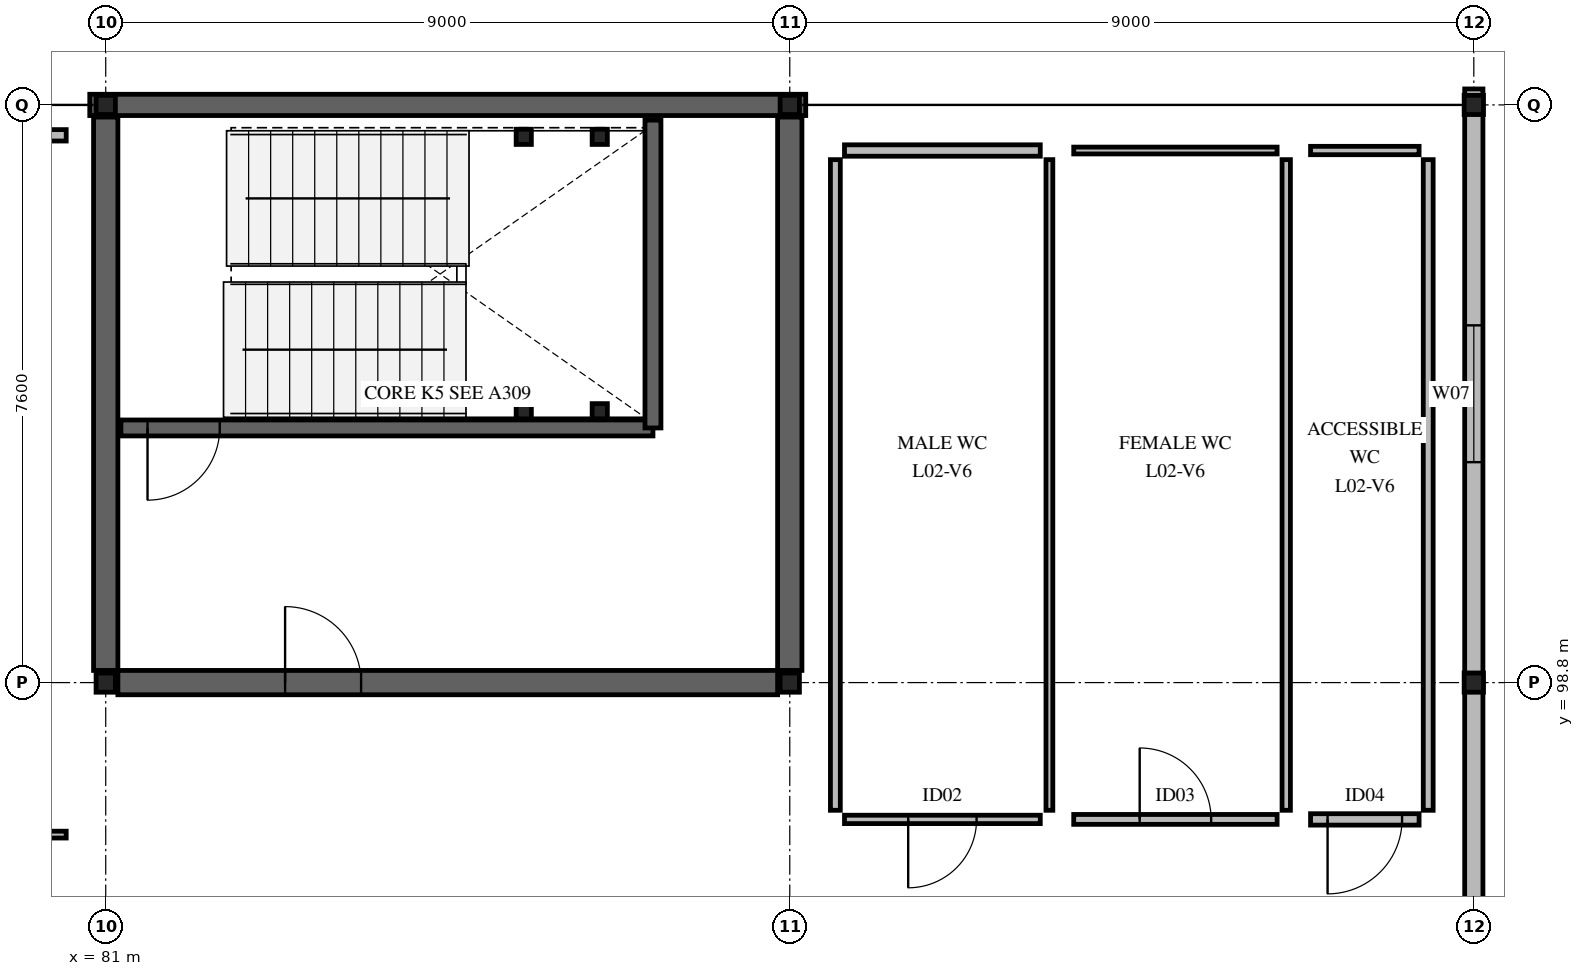
"""IFC4 building model, lengths in metres.
Left out: names, types, materials, properties, quantities, classifications, styles, units other than length and angle.
Written with IfcOpenShell. Run it as: python <this file> out.ifc"""

import sys

from ifc_helpers import new_model, si_unit, direction, frame, frame_2d, origin, origin_2d, place, context, subcontext, project, spatial, rectangle, hollow_rectangle, i_section, extrude, element, fill, save


model = new_model("IFC4")
c1 = context("Model", 3, precision=1e-05, world=origin(), true_north=direction((0.0, 1.0)))
c2 = subcontext(c1, "Body", "Model", "MODEL_VIEW")
j1 = project(units=[si_unit("LENGTHUNIT", "METRE"), si_unit("PLANEANGLEUNIT", "RADIAN")], contexts=[c1])
p1 = place(None, origin())
s1 = spatial("IfcSite", under=j1, at=p1, CompositionType="ELEMENT")
p2 = place(p1, origin())
s2 = spatial("IfcBuilding", under=s1, at=p2, CompositionType="ELEMENT")
p3 = place(p2, frame((0.0, 0.0, 9.36)))
s3 = spatial("IfcBuildingStorey", under=s2, at=p3, CompositionType="ELEMENT", Elevation=9.36)
for number, where, z_axis, x_axis in (
    (1, (81.0, 98.8, 0.0), (0.0, 0.0, 1.0), (1.0, 0.0, 0.0)),
    (2, (81.0, 106.4, 0.0), (0.0, 0.0, 1.0), (1.0, 0.0, 0.0)),
    (3, (90.0, 98.8, 0.0), (0.0, 0.0, 1.0), (1.0, 0.0, 0.0)),
    (4, (90.0, 106.4, 0.0), (0.0, 0.0, 1.0), (1.0, 0.0, 0.0)),
    (5, (99.0, 98.8, 0.0), (0.0, 0.0, 1.0), (1.0, 0.0, 0.0)),
    (6, (99.0, 106.4, 0.0), (0.0, 0.0, 1.0), (1.0, 0.0, 0.0)),
):
    element("IfcColumn", number, at=place(p3, frame(where, z_axis=z_axis, x_axis=x_axis)), inside=s3, PredefinedType="COLUMN", context=c2, shape_type="SweptSolid", body=[
        extrude(i_section(OverallWidth=0.254, OverallDepth=0.253, WebThickness=0.009, FlangeThickness=0.014, FilletRadius=0.012, at=origin_2d()), origin(), (0.0, 0.0, 1.0), 4.32),
    ])
p4 = place(p3, frame((80.79, 106.4, 0.0), z_axis=(0.0, 0.0, 1.0), x_axis=(1.0, 0.0, 0.0)))
e7 = element("IfcWall", 7, at=p4, inside=s3, PredefinedType="SOLIDWALL", context=c2, shape_type="SweptSolid", body=[
    extrude(rectangle(XDim=9.42, YDim=0.28, at=frame_2d((4.71, 0.0))), origin(), (0.0, 0.0, 1.0), 4.08),
])
p5 = place(p3, frame((99.0, 90.99, 0.0), z_axis=(0.0, 0.0, 1.0), x_axis=(0.0, 1.0, 0.0)))
e8 = element("IfcWall", 8, at=p5, inside=s3, PredefinedType="STANDARD", context=c2, shape_type="SweptSolid", body=[
    extrude(rectangle(XDim=7.81, YDim=0.24, at=frame_2d((3.905, 0.0))), origin(), (0.0, 0.0, 1.0), 3.701),
])
p6 = place(p5, frame((3.26, 0.0, 0.85)))
e9 = element("IfcOpeningElement", 9, at=p6, cuts=e8, PredefinedType="OPENING", context=c2, shape_type="SweptSolid", body=[
    extrude(rectangle(XDim=1.5, YDim=1.2, at=frame_2d((0.75, 0.6))), frame((0.0, 0.13, 0.0), z_axis=(0.0, -1.0, 0.0), x_axis=(1.0, 0.0, 0.0)), (0.0, 0.0, 1.0), 0.26),
])
p7 = place(p3, frame((99.0, 98.8, 0.0), z_axis=(0.0, 0.0, 1.0), x_axis=(0.0, 1.0, 0.0)))
e10 = element("IfcWall", 10, at=p7, inside=s3, PredefinedType="STANDARD", context=c2, shape_type="SweptSolid", body=[
    extrude(rectangle(XDim=7.81, YDim=0.24, at=frame_2d((3.905, 0.0))), origin(), (0.0, 0.0, 1.0), 3.701),
])
p8 = place(p7, frame((2.9, 0.0, 0.85)))
e11 = element("IfcOpeningElement", 11, at=p8, cuts=e10, PredefinedType="OPENING", context=c2, shape_type="SweptSolid", body=[
    extrude(rectangle(XDim=1.8, YDim=1.2, at=frame_2d((0.9, 0.6))), frame((0.0, 0.13, 0.0), z_axis=(0.0, -1.0, 0.0), x_axis=(1.0, 0.0, 0.0)), (0.0, 0.0, 1.0), 0.26),
])
p9 = place(p3, frame((81.16, 98.8, 0.0), z_axis=(0.0, 0.0, 1.0), x_axis=(1.0, 0.0, 0.0)))
e12 = element("IfcWall", 12, at=p9, inside=s3, PredefinedType="SHEAR", context=c2, shape_type="SweptSolid", body=[
    extrude(rectangle(XDim=8.68, YDim=0.32, at=frame_2d((4.34, 0.0))), origin(), (0.0, 0.0, 1.0), 4.04),
])
p10 = place(p9, frame((2.2, 0.0, 0.0)))
e13 = element("IfcOpeningElement", 13, at=p10, cuts=e12, PredefinedType="OPENING", context=c2, shape_type="SweptSolid", body=[
    extrude(rectangle(XDim=1.0, YDim=2.15, at=frame_2d((0.5, 1.075))), frame((0.0, 0.17, 0.0), z_axis=(0.0, -1.0, 0.0), x_axis=(1.0, 0.0, 0.0)), (0.0, 0.0, 1.0), 0.34),
])
for number, where, z_axis, x_axis in (
    (14, (81.0, 98.96, 0.0), (0.0, 0.0, 1.0), (0.0, 1.0, 0.0)),
    (15, (90.0, 98.96, 0.0), (0.0, 0.0, 1.0), (0.0, 1.0, 0.0)),
):
    element("IfcWall", number, at=place(p3, frame(where, z_axis=z_axis, x_axis=x_axis)), inside=s3, PredefinedType="SHEAR", context=c2, shape_type="SweptSolid", body=[
        extrude(rectangle(XDim=7.28, YDim=0.32, at=frame_2d((3.64, 0.0))), origin(), (0.0, 0.0, 1.0), 4.04),
    ])
p11 = place(p3, frame((81.2, 102.15, 0.0), z_axis=(0.0, 0.0, 1.0), x_axis=(1.0, 0.0, 0.0)))
e16 = element("IfcWall", 16, at=p11, inside=s3, PredefinedType="SOLIDWALL", context=c2, shape_type="SweptSolid", body=[
    extrude(rectangle(XDim=7.0, YDim=0.21, at=frame_2d((3.5, 0.0))), origin(), (0.0, 0.0, 1.0), 4.04),
])
p12 = place(p11, frame((0.35, 0.0, 0.0)))
e17 = element("IfcOpeningElement", 17, at=p12, cuts=e16, PredefinedType="OPENING", context=c2, shape_type="SweptSolid", body=[
    extrude(rectangle(XDim=0.95, YDim=2.12, at=frame_2d((0.475, 1.06))), frame((0.0, 0.115, 0.0), z_axis=(0.0, -1.0, 0.0), x_axis=(1.0, 0.0, 0.0)), (0.0, 0.0, 1.0), 0.23),
])
p13 = place(p3, frame((88.2, 102.15, 0.0), z_axis=(0.0, 0.0, 1.0), x_axis=(0.0, 1.0, 0.0)))
e18 = element("IfcWall", 18, at=p13, inside=s3, PredefinedType="SOLIDWALL", context=c2, shape_type="SweptSolid", body=[
    extrude(rectangle(XDim=4.05, YDim=0.21, at=frame_2d((2.025, 0.0))), origin(), (0.0, 0.0, 1.0), 4.04),
])
for number, where, z_axis, x_axis in (
    (19, (86.5, 102.37, 0.0), (0.0, 0.0, 1.0), (1.0, 0.0, 0.0)),
    (20, (86.5, 105.98, 0.0), (0.0, 0.0, 1.0), (1.0, 0.0, 0.0)),
    (21, (87.5, 102.37, 0.0), (0.0, 0.0, 1.0), (1.0, 0.0, 0.0)),
    (22, (87.5, 105.98, 0.0), (0.0, 0.0, 1.0), (1.0, 0.0, 0.0)),
):
    element("IfcColumn", number, at=place(p3, frame(where, z_axis=z_axis, x_axis=x_axis)), inside=s3, PredefinedType="COLUMN", context=c2, shape_type="SweptSolid", body=[
        extrude(hollow_rectangle(XDim=0.2, YDim=0.2, WallThickness=0.012, at=origin_2d()), origin(), (0.0, 0.0, 1.0), 1.97),
    ])
p14 = place(p3, frame((54.52, 96.8, 0.0), z_axis=(0.0, 0.0, 1.0), x_axis=(1.0, 0.0, 0.0)))
e23 = element("IfcWall", 23, at=p14, inside=s3, PredefinedType="PARTITIONING", context=c2, shape_type="SweptSolid", body=[
    extrude(rectangle(XDim=25.96, YDim=0.09, at=frame_2d((12.98, 0.0))), origin(), (0.0, 0.0, 1.0), 4.04),
])
p15 = place(p14, frame((12.47, 0.0, 0.0)))
e24 = element("IfcOpeningElement", 24, at=p15, cuts=e23, PredefinedType="OPENING", context=c2, shape_type="SweptSolid", body=[
    extrude(rectangle(XDim=1.02, YDim=2.1, at=frame_2d((0.51, 1.05))), frame((0.0, 0.055, 0.0), z_axis=(0.0, -1.0, 0.0), x_axis=(1.0, 0.0, 0.0)), (0.0, 0.0, 1.0), 0.11),
])
p16 = place(p3, frame((54.52, 106.0, 0.0), z_axis=(0.0, 0.0, 1.0), x_axis=(1.0, 0.0, 0.0)))
e25 = element("IfcWall", 25, at=p16, inside=s3, PredefinedType="PARTITIONING", context=c2, shape_type="SweptSolid", body=[
    extrude(rectangle(XDim=25.96, YDim=0.15, at=frame_2d((12.98, 0.0))), origin(), (0.0, 0.0, 1.0), 4.04),
])
p17 = place(p3, frame((90.6, 97.12, 0.0), z_axis=(0.0, 0.0, 1.0), x_axis=(0.0, 1.0, 0.0)))
e26 = element("IfcWall", 26, at=p17, inside=s3, PredefinedType="PARTITIONING", context=c2, shape_type="SweptSolid", body=[
    extrude(rectangle(XDim=8.56, YDim=0.13, at=frame_2d((4.28, 0.0))), origin(), (0.0, 0.0, 1.0), 4.04),
])
p18 = place(p3, frame((90.72, 97.0, 0.0), z_axis=(0.0, 0.0, 1.0), x_axis=(1.0, 0.0, 0.0)))
e27 = element("IfcWall", 27, at=p18, inside=s3, PredefinedType="PARTITIONING", context=c2, shape_type="SweptSolid", body=[
    extrude(rectangle(XDim=2.576, YDim=0.11, at=frame_2d((1.288, 0.0))), origin(), (0.0, 0.0, 1.0), 4.04),
])
p19 = place(p18, frame((0.838, 0.0, 0.0)))
e28 = element("IfcOpeningElement", 28, at=p19, cuts=e27, PredefinedType="OPENING", context=c2, shape_type="SweptSolid", body=[
    extrude(rectangle(XDim=0.9, YDim=2.06, at=frame_2d((0.45, 1.03))), frame((0.0, 0.065, 0.0), z_axis=(0.0, -1.0, 0.0), x_axis=(1.0, 0.0, 0.0)), (0.0, 0.0, 1.0), 0.13),
])
p20 = place(p3, frame((93.416, 97.12, 0.0), z_axis=(0.0, 0.0, 1.0), x_axis=(0.0, 1.0, 0.0)))
e29 = element("IfcWall", 29, at=p20, inside=s3, PredefinedType="PARTITIONING", context=c2, shape_type="SweptSolid", body=[
    extrude(rectangle(XDim=8.56, YDim=0.09, at=frame_2d((4.28, 0.0))), origin(), (0.0, 0.0, 1.0), 4.04),
])
p21 = place(p3, frame((90.72, 105.8, 0.0), z_axis=(0.0, 0.0, 1.0), x_axis=(1.0, 0.0, 0.0)))
e30 = element("IfcWall", 30, at=p21, inside=s3, PredefinedType="PARTITIONING", context=c2, shape_type="SweptSolid", body=[
    extrude(rectangle(XDim=2.576, YDim=0.15, at=frame_2d((1.288, 0.0))), origin(), (0.0, 0.0, 1.0), 4.04),
])
p22 = place(p3, frame((93.736, 97.0, 0.0), z_axis=(0.0, 0.0, 1.0), x_axis=(1.0, 0.0, 0.0)))
e31 = element("IfcWall", 31, at=p22, inside=s3, PredefinedType="PARTITIONING", context=c2, shape_type="SweptSolid", body=[
    extrude(rectangle(XDim=2.676, YDim=0.13, at=frame_2d((1.338, 0.0))), origin(), (0.0, 0.0, 1.0), 4.04),
])
p23 = place(p22, frame((0.868, 0.0, 0.0)))
e32 = element("IfcOpeningElement", 32, at=p23, cuts=e31, PredefinedType="OPENING", context=c2, shape_type="SweptSolid", body=[
    extrude(rectangle(XDim=0.94, YDim=2.06, at=frame_2d((0.47, 1.03))), frame((0.0, 0.075, 0.0), z_axis=(0.0, -1.0, 0.0), x_axis=(1.0, 0.0, 0.0)), (0.0, 0.0, 1.0), 0.15),
])
p24 = place(p3, frame((96.532, 97.12, 0.0), z_axis=(0.0, 0.0, 1.0), x_axis=(0.0, 1.0, 0.0)))
e33 = element("IfcWall", 33, at=p24, inside=s3, PredefinedType="PARTITIONING", context=c2, shape_type="SweptSolid", body=[
    extrude(rectangle(XDim=8.56, YDim=0.11, at=frame_2d((4.28, 0.0))), origin(), (0.0, 0.0, 1.0), 4.04),
])
p25 = place(p3, frame((93.736, 105.8, 0.0), z_axis=(0.0, 0.0, 1.0), x_axis=(1.0, 0.0, 0.0)))
e34 = element("IfcWall", 34, at=p25, inside=s3, PredefinedType="PARTITIONING", context=c2, shape_type="SweptSolid", body=[
    extrude(rectangle(XDim=2.676, YDim=0.09, at=frame_2d((1.338, 0.0))), origin(), (0.0, 0.0, 1.0), 4.04),
])
p26 = place(p3, frame((96.852, 97.0, 0.0), z_axis=(0.0, 0.0, 1.0), x_axis=(1.0, 0.0, 0.0)))
e35 = element("IfcWall", 35, at=p26, inside=s3, PredefinedType="PARTITIONING", context=c2, shape_type="SweptSolid", body=[
    extrude(rectangle(XDim=1.428, YDim=0.15, at=frame_2d((0.714, 0.0))), origin(), (0.0, 0.0, 1.0), 4.04),
])
p27 = place(p26, frame((0.224, 0.0, 0.0)))
e36 = element("IfcOpeningElement", 36, at=p27, cuts=e35, PredefinedType="OPENING", context=c2, shape_type="SweptSolid", body=[
    extrude(rectangle(XDim=0.98, YDim=2.06, at=frame_2d((0.49, 1.03))), frame((0.0, 0.085, 0.0), z_axis=(0.0, -1.0, 0.0), x_axis=(1.0, 0.0, 0.0)), (0.0, 0.0, 1.0), 0.17),
])
p28 = place(p3, frame((98.4, 97.12, 0.0), z_axis=(0.0, 0.0, 1.0), x_axis=(0.0, 1.0, 0.0)))
e37 = element("IfcWall", 37, at=p28, inside=s3, PredefinedType="PARTITIONING", context=c2, shape_type="SweptSolid", body=[
    extrude(rectangle(XDim=8.56, YDim=0.13, at=frame_2d((4.28, 0.0))), origin(), (0.0, 0.0, 1.0), 4.04),
])
p29 = place(p3, frame((96.852, 105.8, 0.0), z_axis=(0.0, 0.0, 1.0), x_axis=(1.0, 0.0, 0.0)))
e38 = element("IfcWall", 38, at=p29, inside=s3, PredefinedType="PARTITIONING", context=c2, shape_type="SweptSolid", body=[
    extrude(rectangle(XDim=1.428, YDim=0.11, at=frame_2d((0.714, 0.0))), origin(), (0.0, 0.0, 1.0), 4.04),
])
p30 = place(p8, origin())
e39 = element("IfcWindow", 39, at=p30, inside=s3, PartitioningType="SINGLE_PANEL", PredefinedType="WINDOW", context=c2, shape_type="SweptSolid", body=[
    extrude(rectangle(XDim=1.8, YDim=1.2, at=frame_2d((0.9, 0.6))), frame((0.0, 0.03, 0.0), z_axis=(0.0, -1.0, 0.0), x_axis=(1.0, 0.0, 0.0)), (0.0, 0.0, 1.0), 0.06),
])
fill(e11, e39)
p31 = place(p12, origin())
e40 = element("IfcDoor", 40, at=p31, inside=s3, OperationType="SINGLE_SWING_RIGHT", PredefinedType="DOOR", context=c2, shape_type="SweptSolid", body=[
    extrude(rectangle(XDim=0.95, YDim=2.12, at=frame_2d((0.475, 1.06))), frame((0.0, 0.025, 0.0), z_axis=(0.0, -1.0, 0.0), x_axis=(1.0, 0.0, 0.0)), (0.0, 0.0, 1.0), 0.05),
])
fill(e17, e40)
p32 = place(p10, origin())
e41 = element("IfcDoor", 41, at=p32, inside=s3, OperationType="SINGLE_SWING_LEFT", PredefinedType="DOOR", context=c2, shape_type="SweptSolid", body=[
    extrude(rectangle(XDim=1.0, YDim=2.15, at=frame_2d((0.5, 1.075))), frame((0.0, 0.025, 0.0), z_axis=(0.0, -1.0, 0.0), x_axis=(1.0, 0.0, 0.0)), (0.0, 0.0, 1.0), 0.05),
])
fill(e13, e41)
p33 = place(p19, origin())
e42 = element("IfcDoor", 42, at=p33, inside=s3, OperationType="SINGLE_SWING_RIGHT", PredefinedType="DOOR", context=c2, shape_type="SweptSolid", body=[
    extrude(rectangle(XDim=0.9, YDim=2.06, at=frame_2d((0.45, 1.03))), frame((0.0, 0.025, 0.0), z_axis=(0.0, -1.0, 0.0), x_axis=(1.0, 0.0, 0.0)), (0.0, 0.0, 1.0), 0.05),
])
fill(e28, e42)
p34 = place(p23, origin())
e43 = element("IfcDoor", 43, at=p34, inside=s3, OperationType="SINGLE_SWING_LEFT", PredefinedType="DOOR", context=c2, shape_type="SweptSolid", body=[
    extrude(rectangle(XDim=0.94, YDim=2.06, at=frame_2d((0.47, 1.03))), frame((0.0, 0.025, 0.0), z_axis=(0.0, -1.0, 0.0), x_axis=(1.0, 0.0, 0.0)), (0.0, 0.0, 1.0), 0.05),
])
fill(e32, e43)
p35 = place(p27, origin())
e44 = element("IfcDoor", 44, at=p35, inside=s3, OperationType="SINGLE_SWING_RIGHT", PredefinedType="DOOR", context=c2, shape_type="SweptSolid", body=[
    extrude(rectangle(XDim=0.98, YDim=2.06, at=frame_2d((0.49, 1.03))), frame((0.0, 0.025, 0.0), z_axis=(0.0, -1.0, 0.0), x_axis=(1.0, 0.0, 0.0)), (0.0, 0.0, 1.0), 0.05),
])
fill(e36, e44)
save(model, sys.argv[1])
